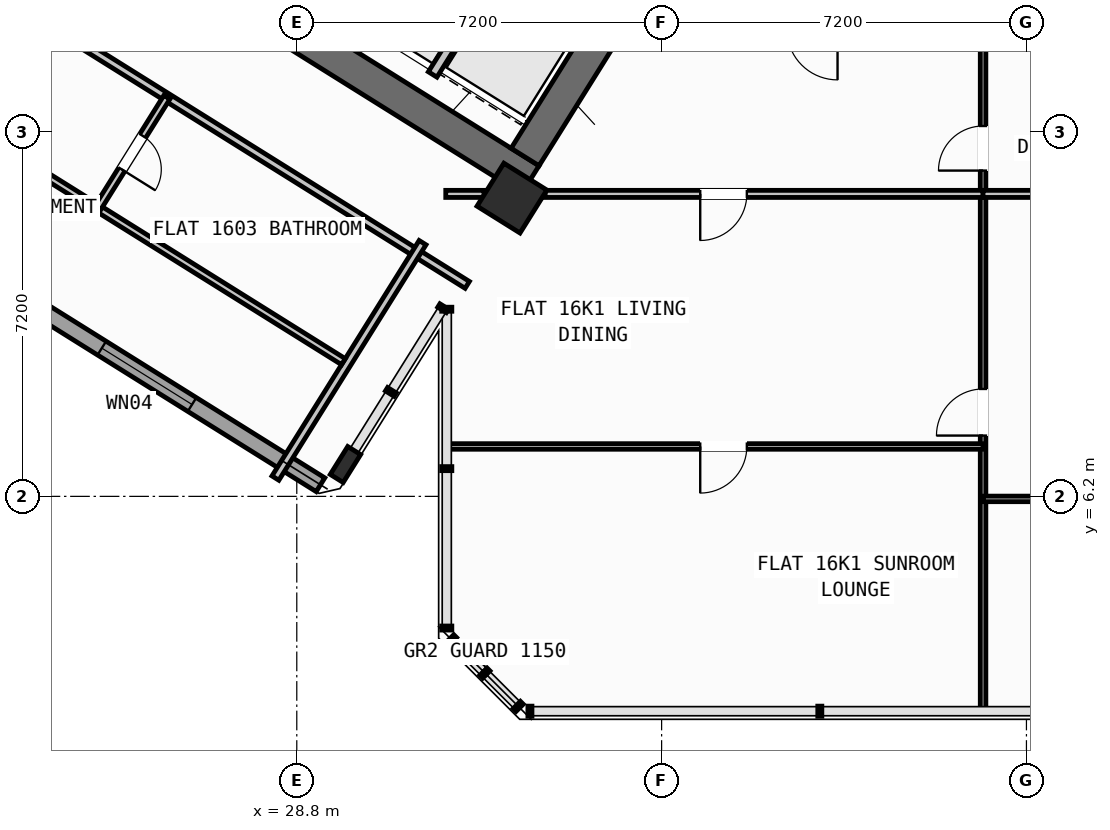
"""IFC4 building model, lengths in metres.
Left out: names, types, materials, properties, quantities, classifications, styles, units other than length and angle.
Written with IfcOpenShell. Run it as: python <this file> out.ifc"""

import sys

from ifc_helpers import new_model, si_unit, direction, frame, frame_2d, origin, origin_2d, place, context, subcontext, project, spatial, rectangle, hollow_rectangle, i_section, extrude, source, transform, mapped, element, fill, save


model = new_model("IFC4")
c1 = context("Model", 3, precision=1e-05, world=origin(), true_north=direction((0.0, 1.0)))
c2 = subcontext(c1, "Body", "Model", "MODEL_VIEW")
j1 = project(units=[si_unit("LENGTHUNIT", "METRE"), si_unit("PLANEANGLEUNIT", "RADIAN")], contexts=[c1])
p1 = place(None, origin())
s1 = spatial("IfcSite", under=j1, at=p1, CompositionType="ELEMENT")
p2 = place(p1, origin())
s2 = spatial("IfcBuilding", under=s1, at=p2, CompositionType="ELEMENT")
p3 = place(p2, frame((0.0, 0.0, 63.6)))
s3 = spatial("IfcBuildingStorey", under=s2, at=p3, CompositionType="ELEMENT", Elevation=63.6)
p4 = place(p3, frame((33.409, 12.45, 0.0), z_axis=(0.0, 0.0, 1.0), x_axis=(-0.848051132073, 0.529914405721, 0.0)))
e1 = element("IfcWall", 1, at=p4, inside=s3, PredefinedType="SHEAR", context=c2, shape_type="SweptSolid", body=[
    extrude(rectangle(XDim=13.24, YDim=0.65, at=frame_2d((6.62, 0.0))), origin(), (0.0, 0.0, 1.0), 3.35),
])
p5 = place(p3, frame((36.683, 18.304, 0.0), z_axis=(0.0, 0.0, 1.0), x_axis=(-0.529899109053, -0.848060690178, 0.0)))
e2 = element("IfcWall", 2, at=p5, inside=s3, PredefinedType="SHEAR", context=c2, shape_type="SweptSolid", body=[
    extrude(rectangle(XDim=6.375, YDim=0.65, at=frame_2d((3.188, 0.0))), origin(), (0.0, 0.0, 1.0), 3.35),
])
m1 = source(origin(), c2, "Body", "SweptSolid", [
    extrude(hollow_rectangle(XDim=1.0, YDim=1.0, WallThickness=0.04, at=origin_2d()), origin(), (0.0, 0.0, 1.0), 3.6),
])
p6 = place(p3, frame((33.046, 12.087, 0.0), z_axis=(0.0, 0.0, 1.0), x_axis=(-0.848048096156, 0.529919264233, 0.0)))
e3 = element("IfcColumn", 3, at=p6, inside=s3, PredefinedType="COLUMN", context=c2, shape_type="MappedRepresentation", body=[
    mapped(m1, transform((0.0, 0.0, 0.0), scale=1.0)),
])
m2 = source(origin(), c2, "Body", "SweptSolid", [
    extrude(i_section(OverallWidth=0.3, OverallDepth=0.65, WebThickness=0.016, FlangeThickness=0.031, at=origin_2d()), origin(), (0.0, 0.0, 1.0), 3.6),
])
p7 = place(p3, frame((29.761, 6.829, 0.0), z_axis=(0.0, 0.0, 1.0), x_axis=(-0.848048096156, 0.529919264233, 0.0)))
e4 = element("IfcColumn", 4, at=p7, inside=s3, PredefinedType="COLUMN", context=c2, shape_type="MappedRepresentation", body=[
    mapped(m2, transform((0.0, 0.0, 0.0), scale=1.0)),
])
p8 = place(p3, frame((29.268, 6.429, 0.0), z_axis=(0.0, 0.0, 1.0), x_axis=(-0.848049971435, 0.529916263149, 0.0)))
e5 = element("IfcWall", 5, at=p8, inside=s3, PredefinedType="STANDARD", context=c2, shape_type="SweptSolid", body=[
    extrude(rectangle(XDim=31.588, YDim=0.32, at=frame_2d((15.794, 0.0))), origin(), (0.0, 0.0, 1.0), 3.35),
])
p9 = place(p8, frame((16.362, 0.0, 0.0)))
e6 = element("IfcOpeningElement", 6, at=p9, cuts=e5, PredefinedType="OPENING", context=c2, shape_type="SweptSolid", body=[
    extrude(rectangle(XDim=1.2, YDim=2.15, at=frame_2d((0.6, 1.075))), frame((0.0, 0.17, 0.0), z_axis=(0.0, -1.0, 0.0), x_axis=(1.0, 0.0, 0.0)), (0.0, 0.0, 1.0), 0.34),
])
p10 = place(p8, frame((2.989, 0.0, 0.8)))
e7 = element("IfcOpeningElement", 7, at=p10, cuts=e5, PredefinedType="OPENING", context=c2, shape_type="SweptSolid", body=[
    extrude(rectangle(XDim=2.1, YDim=1.55, at=frame_2d((1.05, 0.775))), frame((0.0, 0.17, 0.0), z_axis=(0.0, -1.0, 0.0), x_axis=(1.0, 0.0, 0.0)), (0.0, 0.0, 1.0), 0.34),
])
p11 = place(p8, frame((8.359, 0.0, 0.8)))
e8 = element("IfcOpeningElement", 8, at=p11, cuts=e5, PredefinedType="OPENING", context=c2, shape_type="SweptSolid", body=[
    extrude(rectangle(XDim=2.1, YDim=1.55, at=frame_2d((1.05, 0.775))), frame((0.0, 0.17, 0.0), z_axis=(0.0, -1.0, 0.0), x_axis=(1.0, 0.0, 0.0)), (0.0, 0.0, 1.0), 0.34),
])
p12 = place(p8, frame((13.284, 0.0, 0.95)))
e9 = element("IfcOpeningElement", 9, at=p12, cuts=e5, PredefinedType="OPENING", context=c2, shape_type="SweptSolid", body=[
    extrude(rectangle(XDim=1.2, YDim=1.4, at=frame_2d((0.6, 0.7))), frame((0.0, 0.17, 0.0), z_axis=(0.0, -1.0, 0.0), x_axis=(1.0, 0.0, 0.0)), (0.0, 0.0, 1.0), 0.34),
])
p13 = place(p8, frame((29.188, 0.0, 0.95)))
e10 = element("IfcOpeningElement", 10, at=p13, cuts=e5, PredefinedType="OPENING", context=c2, shape_type="SweptSolid", body=[
    extrude(rectangle(XDim=1.2, YDim=1.4, at=frame_2d((0.6, 0.7))), frame((0.0, 0.17, 0.0), z_axis=(0.0, -1.0, 0.0), x_axis=(1.0, 0.0, 0.0)), (0.0, 0.0, 1.0), 0.34),
])
p14 = place(p8, frame((19.11, 0.0, 1.0)))
e11 = element("IfcOpeningElement", 11, at=p14, cuts=e5, PredefinedType="OPENING", context=c2, shape_type="SweptSolid", body=[
    extrude(rectangle(XDim=0.9, YDim=1.25, at=frame_2d((0.45, 0.625))), frame((0.0, 0.17, 0.0), z_axis=(0.0, -1.0, 0.0), x_axis=(1.0, 0.0, 0.0)), (0.0, 0.0, 1.0), 0.34),
])
p15 = place(p8, frame((21.226, 0.0, 1.0)))
e12 = element("IfcOpeningElement", 12, at=p15, cuts=e5, PredefinedType="OPENING", context=c2, shape_type="SweptSolid", body=[
    extrude(rectangle(XDim=0.9, YDim=1.25, at=frame_2d((0.45, 0.625))), frame((0.0, 0.17, 0.0), z_axis=(0.0, -1.0, 0.0), x_axis=(1.0, 0.0, 0.0)), (0.0, 0.0, 1.0), 0.34),
])
p16 = place(p8, frame((23.014, 0.0, 1.0)))
e13 = element("IfcOpeningElement", 13, at=p16, cuts=e5, PredefinedType="OPENING", context=c2, shape_type="SweptSolid", body=[
    extrude(rectangle(XDim=0.9, YDim=1.25, at=frame_2d((0.45, 0.625))), frame((0.0, 0.17, 0.0), z_axis=(0.0, -1.0, 0.0), x_axis=(1.0, 0.0, 0.0)), (0.0, 0.0, 1.0), 0.34),
])
p17 = place(p8, frame((24.802, 0.0, 1.0)))
e14 = element("IfcOpeningElement", 14, at=p17, cuts=e5, PredefinedType="OPENING", context=c2, shape_type="SweptSolid", body=[
    extrude(rectangle(XDim=0.9, YDim=1.25, at=frame_2d((0.45, 0.625))), frame((0.0, 0.17, 0.0), z_axis=(0.0, -1.0, 0.0), x_axis=(1.0, 0.0, 0.0)), (0.0, 0.0, 1.0), 0.34),
])
p18 = place(p8, frame((26.59, 0.0, 1.0)))
e15 = element("IfcOpeningElement", 15, at=p18, cuts=e5, PredefinedType="OPENING", context=c2, shape_type="SweptSolid", body=[
    extrude(rectangle(XDim=0.9, YDim=1.25, at=frame_2d((0.45, 0.625))), frame((0.0, 0.17, 0.0), z_axis=(0.0, -1.0, 0.0), x_axis=(1.0, 0.0, 0.0)), (0.0, 0.0, 1.0), 0.34),
])
p19 = place(p3, frame((33.029, 17.003, 0.0), z_axis=(0.0, 0.0, 1.0), x_axis=(-0.529916267533, -0.848049968695, 0.0)))
e16 = element("IfcWall", 16, at=p19, inside=s3, PredefinedType="STANDARD", context=c2, shape_type="SweptSolid", body=[
    extrude(rectangle(XDim=2.92, YDim=0.2, at=frame_2d((1.46, 0.0))), origin(), (0.0, 0.0, 1.0), 3.34),
])
p20 = place(p3, frame((23.899, 26.529, 0.0), z_axis=(0.0, 0.0, 1.0), x_axis=(-0.529917716469, -0.848049063305, 0.0)))
e17 = element("IfcWall", 17, at=p20, inside=s3, PredefinedType="PARTITIONING", context=c2, shape_type="SweptSolid", body=[
    extrude(rectangle(XDim=14.05, YDim=0.16, at=frame_2d((7.025, 0.0))), origin(), (0.0, 0.0, 1.0), 3.34),
])
p21 = place(p3, frame((32.164, 10.374, 0.0), z_axis=(0.0, 0.0, 1.0), x_axis=(-0.848044107957, 0.529925646633, 0.0)))
e18 = element("IfcWall", 18, at=p21, inside=s3, PredefinedType="PARTITIONING", context=c2, shape_type="SweptSolid", body=[
    extrude(rectangle(XDim=15.57, YDim=0.16, at=frame_2d((7.785, 0.0))), origin(), (0.0, 0.0, 1.0), 3.34),
])
p22 = place(p21, frame((10.83, 0.0, 0.0)))
e19 = element("IfcOpeningElement", 19, at=p22, cuts=e18, PredefinedType="OPENING", context=c2, shape_type="SweptSolid", body=[
    extrude(rectangle(XDim=1.0, YDim=2.1, at=frame_2d((0.5, 1.05))), frame((0.0, 0.09, 0.0), z_axis=(0.0, -1.0, 0.0), x_axis=(1.0, 0.0, 0.0)), (0.0, 0.0, 1.0), 0.18),
])
p23 = place(p3, frame((31.282, 11.208, 0.0), z_axis=(0.0, 0.0, 1.0), x_axis=(-0.529938869374, -0.84803584519, 0.0)))
e20 = element("IfcWall", 20, at=p23, inside=s3, PredefinedType="PARTITIONING", context=c2, shape_type="SweptSolid", body=[
    extrude(rectangle(XDim=5.48, YDim=0.16, at=frame_2d((2.74, 0.0))), origin(), (0.0, 0.0, 1.0), 3.34),
])
p24 = place(p3, frame((29.72, 8.859, 0.0), z_axis=(0.0, 0.0, 1.0), x_axis=(-0.848049134363, 0.529917602752, 0.0)))
e21 = element("IfcWall", 21, at=p24, inside=s3, PredefinedType="PLUMBINGWALL", context=c2, shape_type="SweptSolid", body=[
    extrude(rectangle(XDim=14.3, YDim=0.14, at=frame_2d((7.15, 0.0))), origin(), (0.0, 0.0, 1.0), 3.34),
])
p25 = place(p24, frame((9.57, 0.0, 0.0)))
e22 = element("IfcOpeningElement", 22, at=p25, cuts=e21, PredefinedType="OPENING", context=c2, shape_type="SweptSolid", body=[
    extrude(rectangle(XDim=0.92, YDim=2.08, at=frame_2d((0.46, 1.04))), frame((0.0, 0.08, 0.0), z_axis=(0.0, -1.0, 0.0), x_axis=(1.0, 0.0, 0.0)), (0.0, 0.0, 1.0), 0.16),
])
p26 = place(p3, frame((26.237, 14.078, 0.0), z_axis=(0.0, 0.0, 1.0), x_axis=(-0.52995640672, -0.848024885824, 0.0)))
e23 = element("IfcWall", 23, at=p26, inside=s3, PredefinedType="PLUMBINGWALL", context=c2, shape_type="SweptSolid", body=[
    extrude(rectangle(XDim=2.58, YDim=0.14, at=frame_2d((1.29, 0.0))), origin(), (0.0, 0.0, 1.0), 3.34),
])
p27 = place(p26, frame((0.9, 0.0, 0.0)))
e24 = element("IfcOpeningElement", 24, at=p27, cuts=e23, PredefinedType="OPENING", context=c2, shape_type="SweptSolid", body=[
    extrude(rectangle(XDim=0.78, YDim=2.05, at=frame_2d((0.39, 1.025))), frame((0.0, 0.08, 0.0), z_axis=(0.0, -1.0, 0.0), x_axis=(1.0, 0.0, 0.0)), (0.0, 0.0, 1.0), 0.16),
])
p28 = place(p3, frame((42.344, 1.96, 0.0), z_axis=(0.0, 0.0, 1.0), x_axis=(0.0, 1.0, 0.0)))
e25 = element("IfcWall", 25, at=p28, inside=s3, PredefinedType="PARTITIONING", context=c2, shape_type="SweptSolid", body=[
    extrude(rectangle(XDim=13.46, YDim=0.11, at=frame_2d((6.73, 0.0))), origin(), (0.0, 0.0, 1.0), 3.34),
])
p29 = place(p28, frame((5.44, 0.0, 0.0)))
e26 = element("IfcOpeningElement", 26, at=p29, cuts=e25, PredefinedType="OPENING", context=c2, shape_type="SweptSolid", body=[
    extrude(rectangle(XDim=0.92, YDim=2.08, at=frame_2d((0.46, 1.04))), frame((0.0, 0.065, 0.0), z_axis=(0.0, -1.0, 0.0), x_axis=(1.0, 0.0, 0.0)), (0.0, 0.0, 1.0), 0.13),
])
p30 = place(p28, frame((10.67, 0.0, 0.0)))
e27 = element("IfcOpeningElement", 27, at=p30, cuts=e25, PredefinedType="OPENING", context=c2, shape_type="SweptSolid", body=[
    extrude(rectangle(XDim=0.88, YDim=2.08, at=frame_2d((0.44, 1.04))), frame((0.0, 0.065, 0.0), z_axis=(0.0, -1.0, 0.0), x_axis=(1.0, 0.0, 0.0)), (0.0, 0.0, 1.0), 0.13),
])
p31 = place(p3, frame((31.74, 12.17, 0.0), z_axis=(0.0, 0.0, 1.0), x_axis=(1.0, 0.0, 0.0)))
e28 = element("IfcWall", 28, at=p31, inside=s3, PredefinedType="PLUMBINGWALL", context=c2, shape_type="SweptSolid", body=[
    extrude(rectangle(XDim=0.754, YDim=0.14, at=frame_2d((0.377, 0.0))), origin(), (0.0, 0.0, 1.0), 3.34),
])
p32 = place(p3, frame((33.702, 12.17, 0.0), z_axis=(0.0, 0.0, 1.0), x_axis=(1.0, 0.0, 0.0)))
e29 = element("IfcWall", 29, at=p32, inside=s3, PredefinedType="PLUMBINGWALL", context=c2, shape_type="SweptSolid", body=[
    extrude(rectangle(XDim=8.642, YDim=0.14, at=frame_2d((4.321, 0.0))), origin(), (0.0, 0.0, 1.0), 2.525),
])
p33 = place(p32, frame((3.06, 0.0, 0.0)))
e30 = element("IfcOpeningElement", 30, at=p33, cuts=e29, PredefinedType="OPENING", context=c2, shape_type="SweptSolid", body=[
    extrude(rectangle(XDim=0.92, YDim=2.08, at=frame_2d((0.46, 1.04))), frame((0.0, 0.08, 0.0), z_axis=(0.0, -1.0, 0.0), x_axis=(1.0, 0.0, 0.0)), (0.0, 0.0, 1.0), 0.16),
])
p34 = place(p3, frame((42.344, 12.17, 0.0), z_axis=(0.0, 0.0, 1.0), x_axis=(1.0, 0.0, 0.0)))
e31 = element("IfcWall", 31, at=p34, inside=s3, PredefinedType="PLUMBINGWALL", context=c2, shape_type="SweptSolid", body=[
    extrude(rectangle(XDim=9.916, YDim=0.14, at=frame_2d((4.958, 0.0))), origin(), (0.0, 0.0, 1.0), 2.525),
])
p35 = place(p3, frame((31.74, 7.185, 0.0), z_axis=(0.0, 0.0, 1.0), x_axis=(1.0, 0.0, 0.0)))
e32 = element("IfcWall", 32, at=p35, inside=s3, PredefinedType="PARTITIONING", context=c2, shape_type="SweptSolid", body=[
    extrude(rectangle(XDim=10.604, YDim=0.11, at=frame_2d((5.302, 0.0))), origin(), (0.0, 0.0, 1.0), 3.34),
])
p36 = place(p35, frame((5.022, 0.0, 0.0)))
e33 = element("IfcOpeningElement", 33, at=p36, cuts=e32, PredefinedType="OPENING", context=c2, shape_type="SweptSolid", body=[
    extrude(rectangle(XDim=0.92, YDim=2.08, at=frame_2d((0.46, 1.04))), frame((0.0, 0.065, 0.0), z_axis=(0.0, -1.0, 0.0), x_axis=(1.0, 0.0, 0.0)), (0.0, 0.0, 1.0), 0.13),
])
p37 = place(p3, frame((42.344, 6.15, 0.0), z_axis=(0.0, 0.0, 1.0), x_axis=(1.0, 0.0, 0.0)))
e34 = element("IfcWall", 34, at=p37, inside=s3, PredefinedType="PARTITIONING", context=c2, shape_type="SweptSolid", body=[
    extrude(rectangle(XDim=9.916, YDim=0.11, at=frame_2d((4.958, 0.0))), origin(), (0.0, 0.0, 1.0), 3.34),
])
p38 = place(p37, frame((4.268, 0.0, 0.0)))
e35 = element("IfcOpeningElement", 35, at=p38, cuts=e34, PredefinedType="OPENING", context=c2, shape_type="SweptSolid", body=[
    extrude(rectangle(XDim=0.92, YDim=2.08, at=frame_2d((0.46, 1.04))), frame((0.0, 0.065, 0.0), z_axis=(0.0, -1.0, 0.0), x_axis=(1.0, 0.0, 0.0)), (0.0, 0.0, 1.0), 0.13),
])
m3 = source(origin(), c2, "Body", "SweptSolid", [
    extrude(rectangle(XDim=2.1, YDim=1.55, at=frame_2d((1.05, 0.775))), frame((0.0, 0.03, 0.0), z_axis=(0.0, -1.0, 0.0), x_axis=(1.0, 0.0, 0.0)), (0.0, 0.0, 1.0), 0.06),
])
p39 = place(p10, origin())
e36 = element("IfcWindow", 36, at=p39, inside=s3, PartitioningType="SINGLE_PANEL", PredefinedType="WINDOW", context=c2, shape_type="MappedRepresentation", body=[
    mapped(m3, transform((0.0, 0.0, 0.0), scale=1.0)),
])
fill(e7, e36)
m4 = source(origin(), c2, "Body", "SweptSolid", [
    extrude(rectangle(XDim=0.78, YDim=2.05, at=frame_2d((0.39, 1.025))), frame((0.0, 0.025, 0.0), z_axis=(0.0, -1.0, 0.0), x_axis=(1.0, 0.0, 0.0)), (0.0, 0.0, 1.0), 0.05),
])
p40 = place(p27, origin())
e37 = element("IfcDoor", 37, at=p40, inside=s3, OperationType="SINGLE_SWING_RIGHT", PredefinedType="DOOR", context=c2, shape_type="MappedRepresentation", body=[
    mapped(m4, transform((0.0, 0.0, 0.0), scale=1.0)),
])
fill(e24, e37)
m5 = source(origin(), c2, "Body", "SweptSolid", [
    extrude(rectangle(XDim=0.92, YDim=2.08, at=frame_2d((0.46, 1.04))), frame((0.0, 0.025, 0.0), z_axis=(0.0, -1.0, 0.0), x_axis=(1.0, 0.0, 0.0)), (0.0, 0.0, 1.0), 0.05),
])
p41 = place(p36, frame((0.92, 0.0, 0.0), z_axis=(0.0, 0.0, 1.0), x_axis=(-1.0, 0.0, 0.0)))
e38 = element("IfcDoor", 38, at=p41, inside=s3, OperationType="SINGLE_SWING_RIGHT", PredefinedType="DOOR", context=c2, shape_type="MappedRepresentation", body=[
    mapped(m5, transform((0.0, 0.0, 0.0), scale=1.0)),
])
fill(e33, e38)
p42 = place(p29, origin())
e39 = element("IfcDoor", 39, at=p42, inside=s3, OperationType="SINGLE_SWING_LEFT", PredefinedType="DOOR", context=c2, shape_type="MappedRepresentation", body=[
    mapped(m5, transform((0.0, 0.0, 0.0), scale=1.0)),
])
fill(e26, e39)
p43 = place(p33, frame((0.92, 0.0, 0.0), z_axis=(0.0, 0.0, 1.0), x_axis=(-1.0, 0.0, 0.0)))
e40 = element("IfcDoor", 40, at=p43, inside=s3, OperationType="SINGLE_SWING_RIGHT", PredefinedType="DOOR", context=c2, shape_type="MappedRepresentation", body=[
    mapped(m5, transform((0.0, 0.0, 0.0), scale=1.0)),
])
fill(e30, e40)
m6 = source(origin(), c2, "Body", "SweptSolid", [
    extrude(rectangle(XDim=0.88, YDim=2.08, at=frame_2d((0.44, 1.04))), frame((0.0, 0.025, 0.0), z_axis=(0.0, -1.0, 0.0), x_axis=(1.0, 0.0, 0.0)), (0.0, 0.0, 1.0), 0.05),
])
p44 = place(p30, origin())
e41 = element("IfcDoor", 41, at=p44, inside=s3, OperationType="SINGLE_SWING_LEFT", PredefinedType="DOOR", context=c2, shape_type="MappedRepresentation", body=[
    mapped(m6, transform((0.0, 0.0, 0.0), scale=1.0)),
])
fill(e27, e41)
save(model, sys.argv[1])
